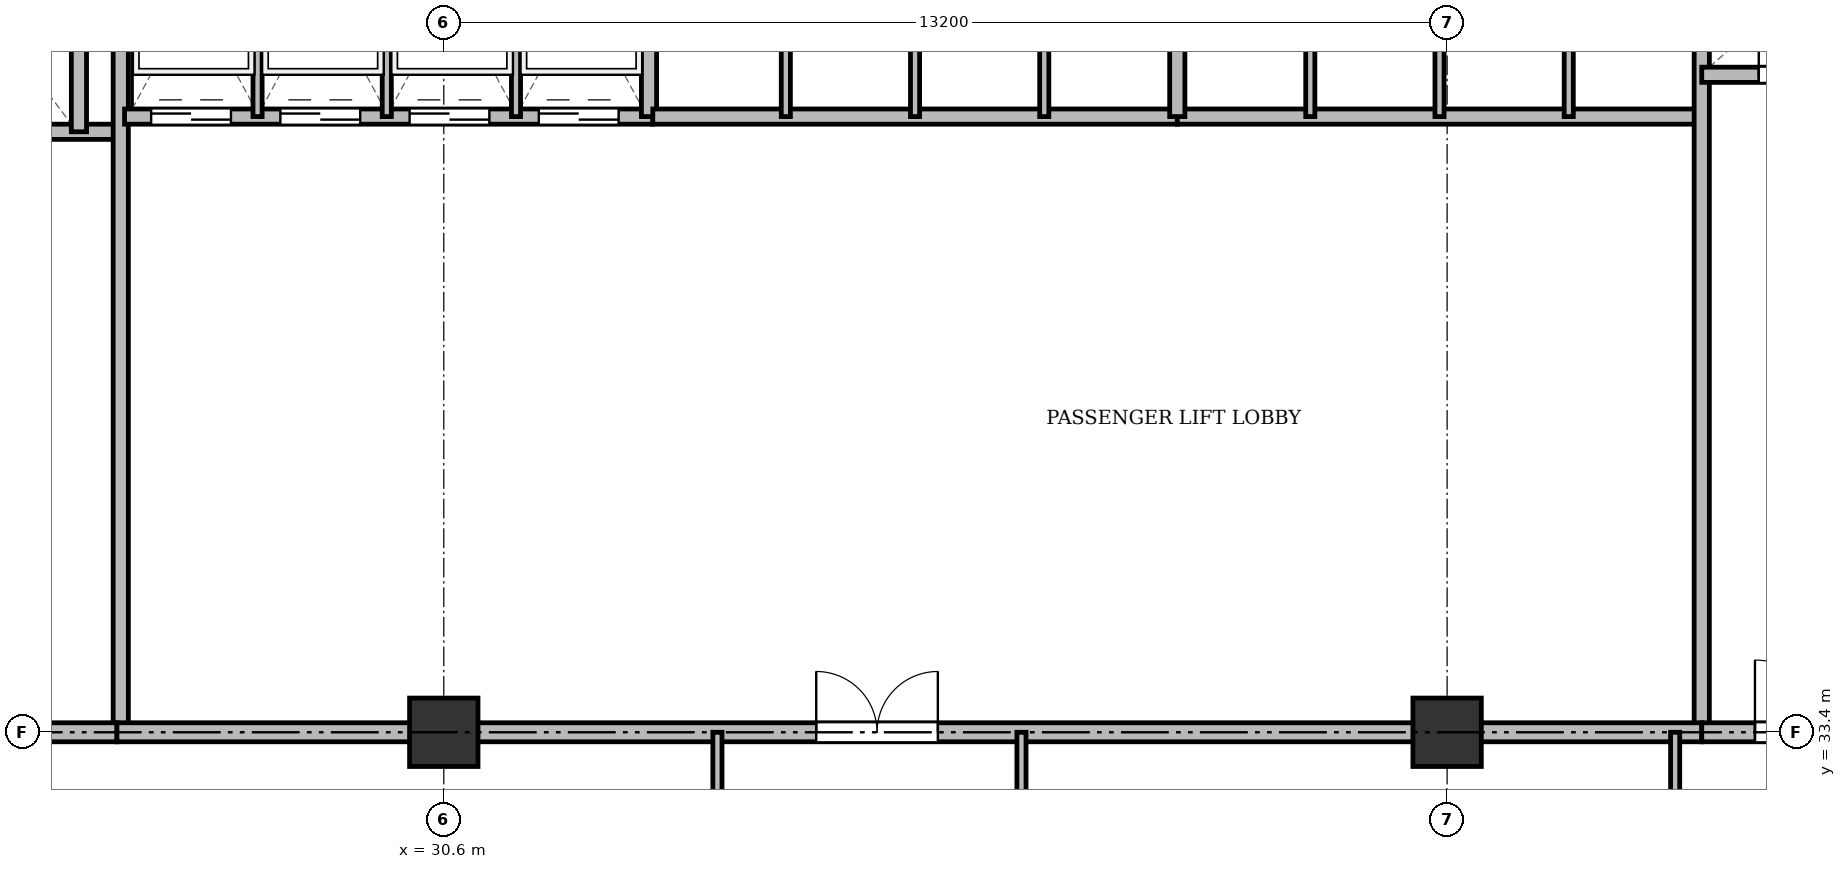
"""IFC4 building model, lengths in metres.
Left out: names, types, materials, properties, quantities, classifications, styles, units other than length and angle.
Written with IfcOpenShell. Run it as: python <this file> out.ifc"""

import sys

from ifc_helpers import new_model, si_unit, direction, frame, frame_2d, origin, origin_2d, place, context, subcontext, project, spatial, rectangle, extrude, source, transform, mapped, element, fill, save


model = new_model("IFC4")
c1 = context("Model", 3, precision=1e-05, world=origin(), true_north=direction((0.0, 1.0)))
c2 = subcontext(c1, "Body", "Model", "MODEL_VIEW")
j1 = project(units=[si_unit("LENGTHUNIT", "METRE"), si_unit("PLANEANGLEUNIT", "RADIAN")], contexts=[c1])
p1 = place(None, origin())
s1 = spatial("IfcSite", under=j1, at=p1, CompositionType="ELEMENT")
p2 = place(p1, origin())
s2 = spatial("IfcBuilding", under=s1, at=p2, CompositionType="ELEMENT")
p3 = place(p2, frame((0.0, 0.0, 23.5)))
s3 = spatial("IfcBuildingStorey", under=s2, at=p3, CompositionType="ELEMENT", Elevation=23.5)
m1 = source(origin(), c2, "Body", "SweptSolid", [
    extrude(rectangle(XDim=0.9, YDim=0.9, at=origin_2d()), origin(), (0.0, 0.0, 1.0), 3.6),
])
for number, where, z_axis, x_axis in (
    (1, (30.6, 33.4, 0.0), (0.0, 0.0, 1.0), (1.0, 0.0, 0.0)),
    (2, (43.8, 33.4, 0.0), (0.0, 0.0, 1.0), (1.0, 0.0, 0.0)),
):
    element("IfcColumn", number, at=place(p3, frame(where, z_axis=z_axis, x_axis=x_axis)), inside=s3, PredefinedType="COLUMN", context=c2, shape_type="MappedRepresentation", body=[
        mapped(m1, transform((0.0, 0.0, 0.0), x_axis=(1.0, 0.0, 0.0), y_axis=(0.0, 1.0, 0.0), z_axis=(0.0, 0.0, 1.0), scale=1.0)),
    ])
p4 = place(p3, frame((19.55, 41.3, 0.0), z_axis=(0.0, 0.0, 1.0), x_axis=(1.0, 0.0, 0.0)))
e3 = element("IfcWall", 3, at=p4, inside=s3, PredefinedType="SOLIDWALL", context=c2, shape_type="SweptSolid", body=[
    extrude(rectangle(XDim=6.75, YDim=0.2, at=frame_2d((3.375, 0.0))), origin(), (0.0, 0.0, 1.0), 3.34),
])
p5 = place(p4, frame((1.7, 0.0, 0.0)))
e4 = element("IfcOpeningElement", 4, at=p5, cuts=e3, PredefinedType="OPENING", context=c2, shape_type="SweptSolid", body=[
    extrude(rectangle(XDim=1.1, YDim=2.15, at=frame_2d((0.55, 1.075))), frame((0.0, 0.11, 0.0), z_axis=(0.0, -1.0, 0.0), x_axis=(1.0, 0.0, 0.0)), (0.0, 0.0, 1.0), 0.22),
])
p6 = place(p4, frame((4.4, 0.0, 0.0)))
e5 = element("IfcOpeningElement", 5, at=p6, cuts=e3, PredefinedType="OPENING", context=c2, shape_type="SweptSolid", body=[
    extrude(rectangle(XDim=1.1, YDim=2.15, at=frame_2d((0.55, 1.075))), frame((0.0, 0.11, 0.0), z_axis=(0.0, -1.0, 0.0), x_axis=(1.0, 0.0, 0.0)), (0.0, 0.0, 1.0), 0.22),
])
p7 = place(p3, frame((25.8, 41.3, 0.0), z_axis=(0.0, 0.0, 1.0), x_axis=(0.0, 1.0, 0.0)))
e6 = element("IfcWall", 6, at=p7, inside=s3, PredefinedType="SOLIDWALL", context=c2, shape_type="SweptSolid", body=[
    extrude(rectangle(XDim=3.4, YDim=0.2, at=frame_2d((1.7, 0.0))), origin(), (0.0, 0.0, 1.0), 3.34),
])
p8 = place(p3, frame((26.35, 33.4, 0.0), z_axis=(0.0, 0.0, 1.0), x_axis=(0.0, 1.0, 0.0)))
e7 = element("IfcWall", 7, at=p8, inside=s3, PredefinedType="SOLIDWALL", context=c2, shape_type="SweptSolid", body=[
    extrude(rectangle(XDim=11.3, YDim=0.2, at=frame_2d((5.65, 0.0))), origin(), (0.0, 0.0, 1.0), 2.69),
])
p9 = place(p3, frame((19.5, 33.4, 0.0), z_axis=(0.0, 0.0, 1.0), x_axis=(1.0, 0.0, 0.0)))
e8 = element("IfcWall", 8, at=p9, inside=s3, PredefinedType="PARTITIONING", context=c2, shape_type="SweptSolid", body=[
    extrude(rectangle(XDim=6.8, YDim=0.25, at=frame_2d((3.4, 0.0))), origin(), (0.0, 0.0, 1.0), 2.69),
])
p10 = place(p9, frame((0.75, 0.0, 0.0)))
e9 = element("IfcOpeningElement", 9, at=p10, cuts=e8, PredefinedType="OPENING", context=c2, shape_type="SweptSolid", body=[
    extrude(rectangle(XDim=1.6, YDim=2.2, at=frame_2d((0.8, 1.1))), frame((0.0, 0.135, 0.0), z_axis=(0.0, -1.0, 0.0), x_axis=(1.0, 0.0, 0.0)), (0.0, 0.0, 1.0), 0.27),
])
p11 = place(p3, frame((26.4, 41.5, 0.0), z_axis=(0.0, 0.0, 1.0), x_axis=(1.0, 0.0, 0.0)))
e10 = element("IfcWall", 10, at=p11, inside=s3, PredefinedType="SOLIDWALL", context=c2, shape_type="SweptSolid", body=[
    extrude(rectangle(XDim=6.95, YDim=0.2, at=frame_2d((3.475, 0.0))), origin(), (0.0, 0.0, 1.0), 3.34),
])
p12 = place(p11, frame((0.35, 0.0, 0.0)))
e11 = element("IfcOpeningElement", 11, at=p12, cuts=e10, PredefinedType="OPENING", context=c2, shape_type="SweptSolid", body=[
    extrude(rectangle(XDim=1.05, YDim=2.15, at=frame_2d((0.525, 1.075))), frame((0.0, 0.11, 0.0), z_axis=(0.0, -1.0, 0.0), x_axis=(1.0, 0.0, 0.0)), (0.0, 0.0, 1.0), 0.22),
])
p13 = place(p11, frame((2.05, 0.0, 0.0)))
e12 = element("IfcOpeningElement", 12, at=p13, cuts=e10, PredefinedType="OPENING", context=c2, shape_type="SweptSolid", body=[
    extrude(rectangle(XDim=1.05, YDim=2.15, at=frame_2d((0.525, 1.075))), frame((0.0, 0.11, 0.0), z_axis=(0.0, -1.0, 0.0), x_axis=(1.0, 0.0, 0.0)), (0.0, 0.0, 1.0), 0.22),
])
p14 = place(p11, frame((3.75, 0.0, 0.0)))
e13 = element("IfcOpeningElement", 13, at=p14, cuts=e10, PredefinedType="OPENING", context=c2, shape_type="SweptSolid", body=[
    extrude(rectangle(XDim=1.05, YDim=2.15, at=frame_2d((0.525, 1.075))), frame((0.0, 0.11, 0.0), z_axis=(0.0, -1.0, 0.0), x_axis=(1.0, 0.0, 0.0)), (0.0, 0.0, 1.0), 0.22),
])
p15 = place(p11, frame((5.45, 0.0, 0.0)))
e14 = element("IfcOpeningElement", 14, at=p15, cuts=e10, PredefinedType="OPENING", context=c2, shape_type="SweptSolid", body=[
    extrude(rectangle(XDim=1.05, YDim=2.15, at=frame_2d((0.525, 1.075))), frame((0.0, 0.11, 0.0), z_axis=(0.0, -1.0, 0.0), x_axis=(1.0, 0.0, 0.0)), (0.0, 0.0, 1.0), 0.22),
])
p16 = place(p3, frame((33.3, 41.5, 0.0), z_axis=(0.0, 0.0, 1.0), x_axis=(0.0, 1.0, 0.0)))
e15 = element("IfcWall", 15, at=p16, inside=s3, PredefinedType="SOLIDWALL", context=c2, shape_type="SweptSolid", body=[
    extrude(rectangle(XDim=3.2, YDim=0.2, at=frame_2d((1.6, 0.0))), origin(), (0.0, 0.0, 1.0), 3.34),
])
for number, where, z_axis, x_axis in (
    (16, (28.15, 41.5, 0.0), (0.0, 0.0, 1.0), (0.0, 1.0, 0.0)),
    (17, (29.85, 41.5, 0.0), (0.0, 0.0, 1.0), (0.0, 1.0, 0.0)),
    (18, (31.55, 41.5, 0.0), (0.0, 0.0, 1.0), (0.0, 1.0, 0.0)),
):
    element("IfcWall", number, at=place(p3, frame(where, z_axis=z_axis, x_axis=x_axis)), inside=s3, PredefinedType="PARTITIONING", context=c2, shape_type="SweptSolid", body=[
        extrude(rectangle(XDim=3.2, YDim=0.12, at=frame_2d((1.6, 0.0))), origin(), (0.0, 0.0, 1.0), 3.34),
    ])
p17 = place(p3, frame((33.35, 41.5, 0.0), z_axis=(0.0, 0.0, 1.0), x_axis=(1.0, 0.0, 0.0)))
e19 = element("IfcWall", 19, at=p17, inside=s3, PredefinedType="SOLIDWALL", context=c2, shape_type="SweptSolid", body=[
    extrude(rectangle(XDim=6.9, YDim=0.2, at=frame_2d((3.45, 0.0))), origin(), (0.0, 0.0, 1.0), 3.34),
])
for number, where, z_axis, x_axis in (
    (20, (35.1, 41.5, 0.0), (0.0, 0.0, 1.0), (0.0, 1.0, 0.0)),
    (21, (36.8, 41.5, 0.0), (0.0, 0.0, 1.0), (0.0, 1.0, 0.0)),
    (22, (38.5, 41.5, 0.0), (0.0, 0.0, 1.0), (0.0, 1.0, 0.0)),
):
    element("IfcWall", number, at=place(p3, frame(where, z_axis=z_axis, x_axis=x_axis)), inside=s3, PredefinedType="PARTITIONING", context=c2, shape_type="SweptSolid", body=[
        extrude(rectangle(XDim=3.2, YDim=0.12, at=frame_2d((1.6, 0.0))), origin(), (0.0, 0.0, 1.0), 3.34),
    ])
p18 = place(p3, frame((40.25, 41.5, 0.0), z_axis=(0.0, 0.0, 1.0), x_axis=(1.0, 0.0, 0.0)))
e23 = element("IfcWall", 23, at=p18, inside=s3, PredefinedType="SOLIDWALL", context=c2, shape_type="SweptSolid", body=[
    extrude(rectangle(XDim=6.9, YDim=0.2, at=frame_2d((3.45, 0.0))), origin(), (0.0, 0.0, 1.0), 2.752),
])
p19 = place(p3, frame((40.25, 41.5, 0.0), z_axis=(0.0, 0.0, 1.0), x_axis=(0.0, 1.0, 0.0)))
e24 = element("IfcWall", 24, at=p19, inside=s3, PredefinedType="SOLIDWALL", context=c2, shape_type="SweptSolid", body=[
    extrude(rectangle(XDim=3.2, YDim=0.2, at=frame_2d((1.6, 0.0))), origin(), (0.0, 0.0, 1.0), 3.34),
])
p20 = place(p3, frame((42.0, 41.5, 0.0), z_axis=(0.0, 0.0, 1.0), x_axis=(0.0, 1.0, 0.0)))
e25 = element("IfcWall", 25, at=p20, inside=s3, PredefinedType="PARTITIONING", context=c2, shape_type="SweptSolid", body=[
    extrude(rectangle(XDim=3.2, YDim=0.12, at=frame_2d((1.6, 0.0))), origin(), (0.0, 0.0, 1.0), 3.34),
])
p21 = place(p3, frame((43.7, 41.5, 0.0), z_axis=(0.0, 0.0, 1.0), x_axis=(0.0, 1.0, 0.0)))
e26 = element("IfcWall", 26, at=p21, inside=s3, PredefinedType="PARTITIONING", context=c2, shape_type="SweptSolid", body=[
    extrude(rectangle(XDim=3.2, YDim=0.12, at=frame_2d((1.6, 0.0))), origin(), (0.0, 0.0, 1.0), 2.752),
])
p22 = place(p3, frame((45.4, 41.5, 0.0), z_axis=(0.0, 0.0, 1.0), x_axis=(0.0, 1.0, 0.0)))
e27 = element("IfcWall", 27, at=p22, inside=s3, PredefinedType="PARTITIONING", context=c2, shape_type="SweptSolid", body=[
    extrude(rectangle(XDim=3.2, YDim=0.12, at=frame_2d((1.6, 0.0))), origin(), (0.0, 0.0, 1.0), 3.34),
])
p23 = place(p3, frame((47.15, 33.4, 0.0), z_axis=(0.0, 0.0, 1.0), x_axis=(0.0, 1.0, 0.0)))
e28 = element("IfcWall", 28, at=p23, inside=s3, PredefinedType="SOLIDWALL", context=c2, shape_type="SweptSolid", body=[
    extrude(rectangle(XDim=11.3, YDim=0.2, at=frame_2d((5.65, 0.0))), origin(), (0.0, 0.0, 1.0), 2.69),
])
p24 = place(p3, frame((26.3, 33.4, 0.0), z_axis=(0.0, 0.0, 1.0), x_axis=(1.0, 0.0, 0.0)))
e29 = element("IfcWall", 29, at=p24, inside=s3, PredefinedType="PARTITIONING", context=c2, shape_type="SweptSolid", body=[
    extrude(rectangle(XDim=20.85, YDim=0.25, at=frame_2d((10.425, 0.0))), origin(), (0.0, 0.0, 1.0), 2.69),
])
p25 = place(p24, frame((9.2, 0.0, 0.0)))
e30 = element("IfcOpeningElement", 30, at=p25, cuts=e29, PredefinedType="OPENING", context=c2, shape_type="SweptSolid", body=[
    extrude(rectangle(XDim=1.6, YDim=2.2, at=frame_2d((0.8, 1.1))), frame((0.0, 0.135, 0.0), z_axis=(0.0, -1.0, 0.0), x_axis=(1.0, 0.0, 0.0)), (0.0, 0.0, 1.0), 0.27),
])
p26 = place(p3, frame((47.15, 42.05, 0.0), z_axis=(0.0, 0.0, 1.0), x_axis=(1.0, 0.0, 0.0)))
e31 = element("IfcWall", 31, at=p26, inside=s3, PredefinedType="SOLIDWALL", context=c2, shape_type="SweptSolid", body=[
    extrude(rectangle(XDim=7.85, YDim=0.2, at=frame_2d((3.925, 0.0))), origin(), (0.0, 0.0, 1.0), 2.752),
])
p27 = place(p26, frame((0.75, 0.0, 0.0)))
e32 = element("IfcOpeningElement", 32, at=p27, cuts=e31, PredefinedType="OPENING", context=c2, shape_type="SweptSolid", body=[
    extrude(rectangle(XDim=0.9, YDim=2.1, at=frame_2d((0.45, 1.05))), frame((0.0, 0.11, 0.0), z_axis=(0.0, -1.0, 0.0), x_axis=(1.0, 0.0, 0.0)), (0.0, 0.0, 1.0), 0.22),
])
p28 = place(p26, frame((3.85, 0.0, 0.0)))
e33 = element("IfcOpeningElement", 33, at=p28, cuts=e31, PredefinedType="OPENING", context=c2, shape_type="SweptSolid", body=[
    extrude(rectangle(XDim=0.9, YDim=2.1, at=frame_2d((0.45, 1.05))), frame((0.0, 0.11, 0.0), z_axis=(0.0, -1.0, 0.0), x_axis=(1.0, 0.0, 0.0)), (0.0, 0.0, 1.0), 0.22),
])
p29 = place(p3, frame((47.15, 33.4, 0.0), z_axis=(0.0, 0.0, 1.0), x_axis=(1.0, 0.0, 0.0)))
e34 = element("IfcWall", 34, at=p29, inside=s3, PredefinedType="PARTITIONING", context=c2, shape_type="SweptSolid", body=[
    extrude(rectangle(XDim=11.15, YDim=0.25, at=frame_2d((5.575, 0.0))), origin(), (0.0, 0.0, 1.0), 2.69),
])
p30 = place(p29, frame((0.7, 0.0, 0.0)))
e35 = element("IfcOpeningElement", 35, at=p30, cuts=e34, PredefinedType="OPENING", context=c2, shape_type="SweptSolid", body=[
    extrude(rectangle(XDim=0.95, YDim=2.15, at=frame_2d((0.475, 1.075))), frame((0.0, 0.135, 0.0), z_axis=(0.0, -1.0, 0.0), x_axis=(1.0, 0.0, 0.0)), (0.0, 0.0, 1.0), 0.27),
])
p31 = place(p29, frame((6.0, 0.0, 0.0)))
e36 = element("IfcOpeningElement", 36, at=p31, cuts=e34, PredefinedType="OPENING", context=c2, shape_type="SweptSolid", body=[
    extrude(rectangle(XDim=1.2, YDim=2.15, at=frame_2d((0.6, 1.075))), frame((0.0, 0.135, 0.0), z_axis=(0.0, -1.0, 0.0), x_axis=(1.0, 0.0, 0.0)), (0.0, 0.0, 1.0), 0.27),
])
for number, where, z_axis, x_axis in (
    (37, (34.2, 29.8, 0.0), (0.0, 0.0, 1.0), (0.0, 1.0, 0.0)),
    (38, (38.2, 29.8, 0.0), (0.0, 0.0, 1.0), (0.0, 1.0, 0.0)),
    (39, (46.8, 29.8, 0.0), (0.0, 0.0, 1.0), (0.0, 1.0, 0.0)),
):
    element("IfcWall", number, at=place(p3, frame(where, z_axis=z_axis, x_axis=x_axis)), inside=s3, PredefinedType="PARTITIONING", context=c2, shape_type="SweptSolid", body=[
        extrude(rectangle(XDim=3.6, YDim=0.12, at=frame_2d((1.8, 0.0))), origin(), (0.0, 0.0, 1.0), 2.69),
    ])
m2 = source(origin(), c2, "Body", "SweptSolid", [
    extrude(rectangle(XDim=1.05, YDim=2.15, at=frame_2d((0.525, 1.075))), frame((0.0, 0.025, 0.0), z_axis=(0.0, -1.0, 0.0), x_axis=(1.0, 0.0, 0.0)), (0.0, 0.0, 1.0), 0.05),
])
p32 = place(p12, origin())
e40 = element("IfcDoor", 40, at=p32, inside=s3, OperationType="DOUBLE_DOOR_SLIDING", PredefinedType="DOOR", context=c2, shape_type="MappedRepresentation", body=[
    mapped(m2, transform((0.0, 0.0, 0.0), x_axis=(1.0, 0.0, 0.0), y_axis=(0.0, 1.0, 0.0), z_axis=(0.0, 0.0, 1.0), scale=1.0)),
])
fill(e11, e40)
p33 = place(p13, origin())
e41 = element("IfcDoor", 41, at=p33, inside=s3, OperationType="DOUBLE_DOOR_SLIDING", PredefinedType="DOOR", context=c2, shape_type="MappedRepresentation", body=[
    mapped(m2, transform((0.0, 0.0, 0.0), x_axis=(1.0, 0.0, 0.0), y_axis=(0.0, 1.0, 0.0), z_axis=(0.0, 0.0, 1.0), scale=1.0)),
])
fill(e12, e41)
p34 = place(p14, origin())
e42 = element("IfcDoor", 42, at=p34, inside=s3, OperationType="DOUBLE_DOOR_SLIDING", PredefinedType="DOOR", context=c2, shape_type="MappedRepresentation", body=[
    mapped(m2, transform((0.0, 0.0, 0.0), x_axis=(1.0, 0.0, 0.0), y_axis=(0.0, 1.0, 0.0), z_axis=(0.0, 0.0, 1.0), scale=1.0)),
])
fill(e13, e42)
p35 = place(p15, origin())
e43 = element("IfcDoor", 43, at=p35, inside=s3, OperationType="DOUBLE_DOOR_SLIDING", PredefinedType="DOOR", context=c2, shape_type="MappedRepresentation", body=[
    mapped(m2, transform((0.0, 0.0, 0.0), x_axis=(1.0, 0.0, 0.0), y_axis=(0.0, 1.0, 0.0), z_axis=(0.0, 0.0, 1.0), scale=1.0)),
])
fill(e14, e43)
m3 = source(origin(), c2, "Body", "SweptSolid", [
    extrude(rectangle(XDim=1.6, YDim=2.2, at=frame_2d((0.8, 1.1))), frame((0.0, 0.025, 0.0), z_axis=(0.0, -1.0, 0.0), x_axis=(1.0, 0.0, 0.0)), (0.0, 0.0, 1.0), 0.05),
])
p36 = place(p25, origin())
e44 = element("IfcDoor", 44, at=p36, inside=s3, OperationType="DOUBLE_DOOR_SINGLE_SWING", PredefinedType="DOOR", context=c2, shape_type="MappedRepresentation", body=[
    mapped(m3, transform((0.0, 0.0, 0.0), x_axis=(1.0, 0.0, 0.0), y_axis=(0.0, 1.0, 0.0), z_axis=(0.0, 0.0, 1.0), scale=1.0)),
])
fill(e30, e44)
m4 = source(origin(), c2, "Body", "SweptSolid", [
    extrude(rectangle(XDim=0.9, YDim=2.1, at=frame_2d((0.45, 1.05))), frame((0.0, 0.025, 0.0), z_axis=(0.0, -1.0, 0.0), x_axis=(1.0, 0.0, 0.0)), (0.0, 0.0, 1.0), 0.05),
])
p37 = place(p27, origin())
e45 = element("IfcDoor", 45, at=p37, inside=s3, OperationType="SINGLE_SWING_LEFT", PredefinedType="DOOR", context=c2, shape_type="MappedRepresentation", body=[
    mapped(m4, transform((0.0, 0.0, 0.0), x_axis=(1.0, 0.0, 0.0), y_axis=(0.0, 1.0, 0.0), z_axis=(0.0, 0.0, 1.0), scale=1.0)),
])
fill(e32, e45)
m5 = source(origin(), c2, "Body", "SweptSolid", [
    extrude(rectangle(XDim=0.95, YDim=2.15, at=frame_2d((0.475, 1.075))), frame((0.0, 0.025, 0.0), z_axis=(0.0, -1.0, 0.0), x_axis=(1.0, 0.0, 0.0)), (0.0, 0.0, 1.0), 0.05),
])
p38 = place(p30, origin())
e46 = element("IfcDoor", 46, at=p38, inside=s3, OperationType="SINGLE_SWING_LEFT", PredefinedType="DOOR", context=c2, shape_type="MappedRepresentation", body=[
    mapped(m5, transform((0.0, 0.0, 0.0), x_axis=(1.0, 0.0, 0.0), y_axis=(0.0, 1.0, 0.0), z_axis=(0.0, 0.0, 1.0), scale=1.0)),
])
fill(e35, e46)
save(model, sys.argv[1])
